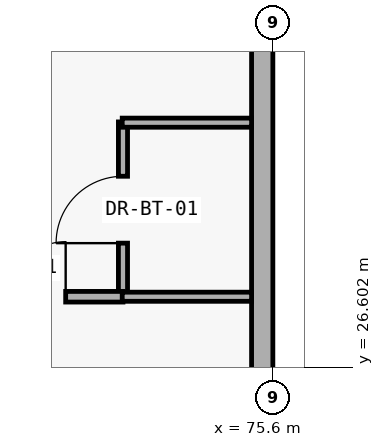
"""IFC4 building model, lengths in metres.
Left out: names, types, materials, properties, quantities, classifications, styles, units other than length and angle.
Written with IfcOpenShell. Run it as: python <this file> out.ifc"""

import sys

from ifc_helpers import new_model, si_unit, direction, frame, frame_2d, origin, place, context, subcontext, project, spatial, rectangle, extrude, element, fill, save


model = new_model("IFC4")
c1 = context("Model", 3, precision=1e-05, world=origin(), true_north=direction((0.0, 1.0)))
c2 = subcontext(c1, "Body", "Model", "MODEL_VIEW")
j1 = project(units=[si_unit("LENGTHUNIT", "METRE"), si_unit("PLANEANGLEUNIT", "RADIAN")], contexts=[c1])
p1 = place(None, origin())
s1 = spatial("IfcSite", under=j1, at=p1, CompositionType="ELEMENT")
p2 = place(p1, origin())
s2 = spatial("IfcBuilding", under=s1, at=p2, CompositionType="ELEMENT")
p3 = place(p2, frame((0.0, 0.0, 30.0)))
s3 = spatial("IfcBuildingStorey", under=s2, at=p3, CompositionType="ELEMENT", Elevation=30.0)
p4 = place(p3, frame((75.46, 34.0, 0.0), z_axis=(0.0, 0.0, 1.0), x_axis=(0.0, -1.0, 0.0)))
e1 = element("IfcWall", 1, at=p4, inside=s3, PredefinedType="SOLIDWALL", context=c2, shape_type="SweptSolid", body=[
    extrude(rectangle(XDim=25.2, YDim=0.28, at=frame_2d((12.6, 0.0))), origin(), (0.0, 0.0, 1.0), 3.34),
])
p5 = place(p4, frame((21.9, 0.0, 0.95)))
e2 = element("IfcOpeningElement", 2, at=p5, cuts=e1, PredefinedType="OPENING", context=c2, shape_type="SweptSolid", body=[
    extrude(rectangle(XDim=1.6, YDim=1.6, at=frame_2d((0.8, 0.8))), frame((0.0, 0.15, 0.0), z_axis=(0.0, -1.0, 0.0), x_axis=(1.0, 0.0, 0.0)), (0.0, 0.0, 1.0), 0.3),
])
p6 = place(p3, frame((73.628, 27.52, 0.0), z_axis=(0.0, 0.0, 1.0), x_axis=(0.0, 1.0, 0.0)))
e3 = element("IfcWall", 3, at=p6, inside=s3, PredefinedType="PARTITIONING", context=c2, shape_type="SweptSolid", body=[
    extrude(rectangle(XDim=2.31, YDim=0.12, at=frame_2d((1.155, 0.0))), origin(), (0.0, 0.0, 1.0), 2.48),
])
p7 = place(p6, frame((0.715, 0.0, 0.0)))
e4 = element("IfcOpeningElement", 4, at=p7, cuts=e3, PredefinedType="OPENING", context=c2, shape_type="SweptSolid", body=[
    extrude(rectangle(XDim=0.88, YDim=2.15, at=frame_2d((0.44, 1.075))), frame((0.0, 0.07, 0.0), z_axis=(0.0, -1.0, 0.0), x_axis=(1.0, 0.0, 0.0)), (0.0, 0.0, 1.0), 0.14),
])
p8 = place(p3, frame((70.943, 27.53, 0.0), z_axis=(0.0, 0.0, 1.0), x_axis=(1.0, 0.0, 0.0)))
e5 = element("IfcWall", 5, at=p8, inside=s3, PredefinedType="PARTITIONING", context=c2, shape_type="SweptSolid", body=[
    extrude(rectangle(XDim=2.685, YDim=0.14, at=frame_2d((1.342, 0.0))), origin(), (0.0, 0.0, 1.0), 2.48),
])
p9 = place(p8, frame((0.481, 0.0, 0.0)))
e6 = element("IfcOpeningElement", 6, at=p9, cuts=e5, PredefinedType="OPENING", context=c2, shape_type="SweptSolid", body=[
    extrude(rectangle(XDim=1.45, YDim=2.3, at=frame_2d((0.725, 1.15))), frame((0.0, 0.08, 0.0), z_axis=(0.0, -1.0, 0.0), x_axis=(1.0, 0.0, 0.0)), (0.0, 0.0, 1.0), 0.16),
])
for number, where, z_axis, x_axis in (
    (7, (73.618, 27.53, 0.0), (0.0, 0.0, 1.0), (1.0, 0.0, 0.0)),
    (8, (73.618, 29.82, 0.0), (0.0, 0.0, 1.0), (1.0, 0.0, 0.0)),
):
    element("IfcWall", number, at=place(p3, frame(where, z_axis=z_axis, x_axis=x_axis)), inside=s3, PredefinedType="PARTITIONING", context=c2, shape_type="SweptSolid", body=[
        extrude(rectangle(XDim=1.702, YDim=0.12, at=frame_2d((0.851, 0.0))), origin(), (0.0, 0.0, 1.0), 2.48),
    ])
p10 = place(p7, origin())
e9 = element("IfcDoor", 9, at=p10, inside=s3, OperationType="SINGLE_SWING_LEFT", PredefinedType="DOOR", context=c2, shape_type="SweptSolid", body=[
    extrude(rectangle(XDim=0.88, YDim=2.15, at=frame_2d((0.44, 1.075))), frame((0.0, 0.025, 0.0), z_axis=(0.0, -1.0, 0.0), x_axis=(1.0, 0.0, 0.0)), (0.0, 0.0, 1.0), 0.05),
])
fill(e4, e9)
p11 = place(p9, origin())
e10 = element("IfcDoor", 10, at=p11, inside=s3, OperationType="DOUBLE_DOOR_SINGLE_SWING", PredefinedType="DOOR", context=c2, shape_type="SweptSolid", body=[
    extrude(rectangle(XDim=1.45, YDim=2.3, at=frame_2d((0.725, 1.15))), frame((0.0, 0.025, 0.0), z_axis=(0.0, -1.0, 0.0), x_axis=(1.0, 0.0, 0.0)), (0.0, 0.0, 1.0), 0.05),
])
fill(e6, e10)
save(model, sys.argv[1])
